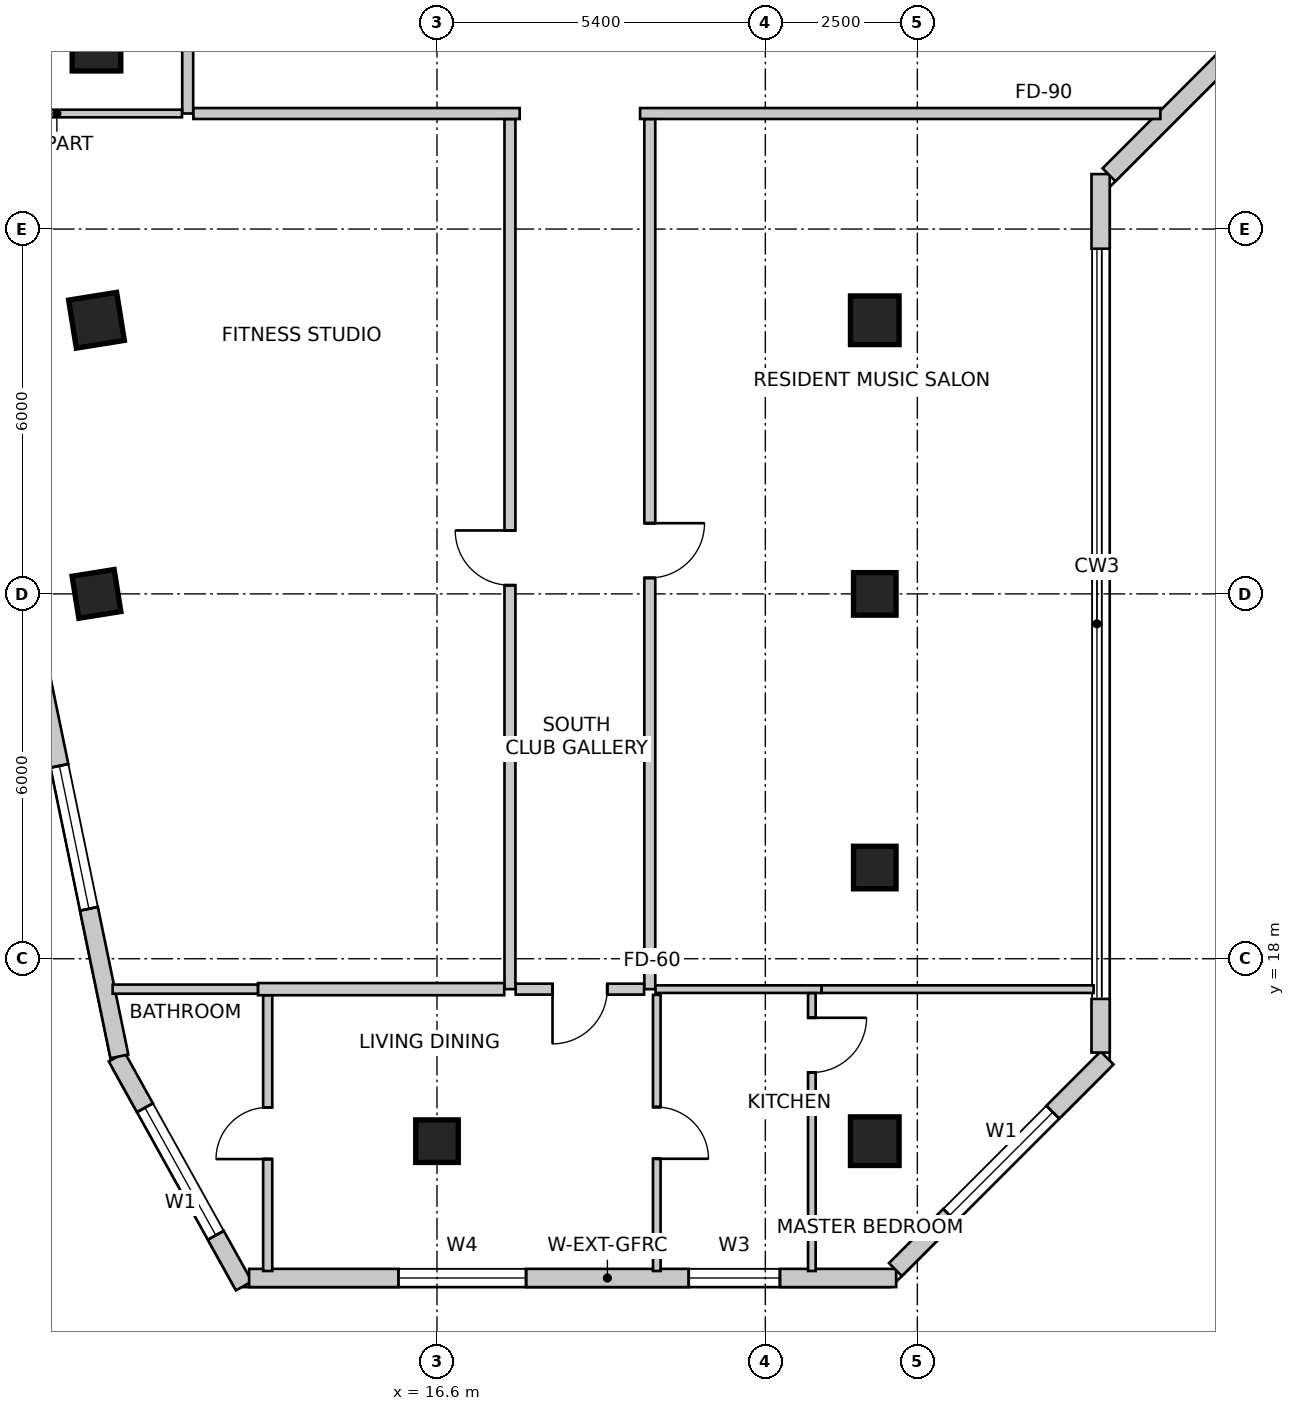
"""IFC4 building model, lengths in metres.
Left out: names, types, materials, properties, quantities, classifications, styles, units other than length and angle.
Written with IfcOpenShell. Run it as: python <this file> out.ifc"""

import sys

from ifc_helpers import new_model, si_unit, direction, frame, frame_2d, origin, origin_2d, place, context, subcontext, project, spatial, rectangle, extrude, source, transform, mapped, element, fill, save


model = new_model("IFC4")
c1 = context("Model", 3, precision=1e-05, world=origin(), true_north=direction((0.0, 1.0)))
c2 = subcontext(c1, "Body", "Model", "MODEL_VIEW")
j1 = project(units=[si_unit("LENGTHUNIT", "METRE"), si_unit("PLANEANGLEUNIT", "RADIAN")], contexts=[c1])
p1 = place(None, origin())
s1 = spatial("IfcSite", under=j1, at=p1, CompositionType="ELEMENT")
p2 = place(p1, origin())
s2 = spatial("IfcBuilding", under=s1, at=p2, CompositionType="ELEMENT")
p3 = place(p2, frame((0.0, 0.0, 225.4)))
s3 = spatial("IfcBuildingStorey", under=s2, at=p3, CompositionType="ELEMENT", Elevation=225.4)
m1 = source(origin(), c2, "Body", "SweptSolid", [
    extrude(rectangle(XDim=0.8, YDim=0.8, at=origin_2d()), origin(), (0.0, 0.0, 1.0), 3.5),
])
for number, where, z_axis, x_axis in (
    (1, (11.0, 33.0, 0.0), (0.0, 0.0, 1.0), (1.0, 0.0, 0.0)),
    (2, (11.0, 28.5, 0.0), (0.0, 0.0, 1.0), (0.158, -0.987, 0.0)),
):
    element("IfcColumn", number, at=place(p3, frame(where, z_axis=z_axis, x_axis=x_axis)), inside=s3, PredefinedType="COLUMN", context=c2, shape_type="MappedRepresentation", body=[
        mapped(m1, transform((0.0, 0.0, 0.0), scale=1.0)),
    ])
m2 = source(origin(), c2, "Body", "SweptSolid", [
    extrude(rectangle(XDim=0.7, YDim=0.7, at=origin_2d()), origin(), (0.0, 0.0, 1.0), 3.5),
])
p4 = place(p3, frame((11.0, 24.0, 0.0), z_axis=(0.0, 0.0, 1.0), x_axis=(0.158158067254, -0.987413806751, 0.0)))
e3 = element("IfcColumn", 3, at=p4, inside=s3, PredefinedType="COLUMN", context=c2, shape_type="MappedRepresentation", body=[
    mapped(m2, transform((0.0, 0.0, 0.0), scale=1.0)),
])
p5 = place(p3, frame((23.8, 28.5, 0.0), z_axis=(0.0, 0.0, 1.0), x_axis=(1.0, 0.0, 0.0)))
e4 = element("IfcColumn", 4, at=p5, inside=s3, PredefinedType="COLUMN", context=c2, shape_type="MappedRepresentation", body=[
    mapped(m1, transform((0.0, 0.0, 0.0), scale=1.0)),
])
for number, where, z_axis, x_axis in (
    (5, (23.8, 24.0, 0.0), (0.0, 0.0, 1.0), (1.0, 0.0, 0.0)),
    (6, (23.8, 19.5, 0.0), (0.0, 0.0, 1.0), (1.0, 0.0, 0.0)),
):
    element("IfcColumn", number, at=place(p3, frame(where, z_axis=z_axis, x_axis=x_axis)), inside=s3, PredefinedType="COLUMN", context=c2, shape_type="MappedRepresentation", body=[
        mapped(m2, transform((0.0, 0.0, 0.0), scale=1.0)),
    ])
p6 = place(p3, frame((23.8, 15.0, 0.0), z_axis=(0.0, 0.0, 1.0), x_axis=(1.0, 0.0, 0.0)))
e7 = element("IfcColumn", 7, at=p6, inside=s3, PredefinedType="COLUMN", context=c2, shape_type="MappedRepresentation", body=[
    mapped(m1, transform((0.0, 0.0, 0.0), scale=1.0)),
])
p7 = place(p3, frame((16.6, 15.0, 0.0), z_axis=(0.0, 0.0, 1.0), x_axis=(1.0, 0.0, 0.0)))
e8 = element("IfcColumn", 8, at=p7, inside=s3, PredefinedType="COLUMN", context=c2, shape_type="MappedRepresentation", body=[
    mapped(m2, transform((0.0, 0.0, 0.0), scale=1.0)),
])
p8 = place(p3, frame((11.333, 16.384, 0.0), z_axis=(0.0, 0.0, 1.0), x_axis=(0.485633305139, -0.874162623852, 0.0)))
e9 = element("IfcWall", 9, at=p8, inside=s3, PredefinedType="SOLIDWALL", context=c2, shape_type="SweptSolid", body=[
    extrude(rectangle(XDim=4.307, YDim=0.3, at=frame_2d((2.153, 0.0))), origin(), (0.0, 0.0, 1.0), 3.25),
])
m3 = source(origin(), c2, "Body", "SweptSolid", [
    extrude(rectangle(XDim=2.4, YDim=2.2, at=frame_2d((1.2, 1.1))), frame((0.0, 0.16, 0.0), z_axis=(0.0, -1.0, 0.0), x_axis=(1.0, 0.0, 0.0)), (0.0, 0.0, 1.0), 0.32),
])
p9 = place(p8, frame((0.954, 0.0, 0.85)))
e10 = element("IfcOpeningElement", 10, at=p9, cuts=e9, PredefinedType="OPENING", context=c2, shape_type="MappedRepresentation", body=[
    mapped(m3, transform((0.0, 0.0, 0.0), scale=1.0)),
])
p10 = place(p3, frame((13.51, 12.75, 0.0), z_axis=(0.0, 0.0, 1.0), x_axis=(1.0, 0.0, 0.0)))
e11 = element("IfcWall", 11, at=p10, inside=s3, PredefinedType="SOLIDWALL", context=c2, shape_type="SweptSolid", body=[
    extrude(rectangle(XDim=10.642, YDim=0.3, at=frame_2d((5.321, 0.0))), origin(), (0.0, 0.0, 1.0), 3.25),
])
m4 = source(origin(), c2, "Body", "SweptSolid", [
    extrude(rectangle(XDim=2.1, YDim=2.0, at=frame_2d((1.05, 1.0))), frame((0.0, 0.16, 0.0), z_axis=(0.0, -1.0, 0.0), x_axis=(1.0, 0.0, 0.0)), (0.0, 0.0, 1.0), 0.32),
])
p11 = place(p10, frame((2.455, 0.0, 0.85)))
e12 = element("IfcOpeningElement", 12, at=p11, cuts=e11, PredefinedType="OPENING", context=c2, shape_type="MappedRepresentation", body=[
    mapped(m4, transform((0.0, 0.0, 0.0), scale=1.0)),
])
m5 = source(origin(), c2, "Body", "SweptSolid", [
    extrude(rectangle(XDim=1.5, YDim=1.8, at=frame_2d((0.75, 0.9))), frame((0.0, 0.16, 0.0), z_axis=(0.0, -1.0, 0.0), x_axis=(1.0, 0.0, 0.0)), (0.0, 0.0, 1.0), 0.32),
])
p12 = place(p10, frame((7.23, 0.0, 0.85)))
e13 = element("IfcOpeningElement", 13, at=p12, cuts=e11, PredefinedType="OPENING", context=c2, shape_type="MappedRepresentation", body=[
    mapped(m5, transform((0.0, 0.0, 0.0), scale=1.0)),
])
p13 = place(p3, frame((24.14, 12.888, 0.0), z_axis=(0.0, 0.0, 1.0), x_axis=(0.707106781187, 0.707106781187, 0.0)))
e14 = element("IfcWall", 14, at=p13, inside=s3, PredefinedType="SOLIDWALL", context=c2, shape_type="SweptSolid", body=[
    extrude(rectangle(XDim=4.922, YDim=0.3, at=frame_2d((2.461, 0.0))), origin(), (0.0, 0.0, 1.0), 3.25),
])
p14 = place(p13, frame((1.261, 0.0, 0.85)))
e15 = element("IfcOpeningElement", 15, at=p14, cuts=e14, PredefinedType="OPENING", context=c2, shape_type="MappedRepresentation", body=[
    mapped(m3, transform((0.0, 0.0, 0.0), scale=1.0)),
])
p15 = place(p3, frame((27.514, 16.457, 0.0), z_axis=(0.0, 0.0, 1.0), x_axis=(0.0, 1.0, 0.0)))
e16 = element("IfcWall", 16, at=p15, inside=s3, PredefinedType="SOLIDWALL", context=c2, shape_type="SweptSolid", body=[
    extrude(rectangle(XDim=0.882, YDim=0.3, at=frame_2d((0.441, 0.0))), origin(), (0.0, 0.0, 1.0), 3.25),
])
p16 = place(p3, frame((27.514, 29.677, 0.0), z_axis=(0.0, 0.0, 1.0), x_axis=(0.0, 1.0, 0.0)))
e17 = element("IfcWall", 17, at=p16, inside=s3, PredefinedType="SOLIDWALL", context=c2, shape_type="SweptSolid", body=[
    extrude(rectangle(XDim=1.228, YDim=0.3, at=frame_2d((0.614, 0.0))), origin(), (0.0, 0.0, 1.0), 3.25),
])
p17 = place(p3, frame((27.652, 30.892, 0.0), z_axis=(0.0, 0.0, 1.0), x_axis=(0.707106781187, 0.707106781187, 0.0)))
e18 = element("IfcWall", 18, at=p17, inside=s3, PredefinedType="SOLIDWALL", context=c2, shape_type="SweptSolid", body=[
    extrude(rectangle(XDim=2.907, YDim=0.3, at=frame_2d((1.454, 0.0))), origin(), (0.0, 0.0, 1.0), 3.25),
])
p18 = place(p3, frame((13.269, 47.134, 0.0), z_axis=(0.0, 0.0, 1.0), x_axis=(-0.319920776449, -0.947444297464, 0.0)))
e19 = element("IfcWall", 19, at=p18, inside=s3, PredefinedType="SOLIDWALL", context=c2, shape_type="SweptSolid", body=[
    extrude(rectangle(XDim=16.133, YDim=0.3, at=frame_2d((8.067, 0.0))), origin(), (0.0, 0.0, 1.0), 3.25),
])
p19 = place(p18, frame((2.513, 0.0, 0.85)))
e20 = element("IfcOpeningElement", 20, at=p19, cuts=e19, PredefinedType="OPENING", context=c2, shape_type="MappedRepresentation", body=[
    mapped(m4, transform((0.0, 0.0, 0.0), scale=1.0)),
])
p20 = place(p18, frame((7.26, 0.0, 0.85)))
e21 = element("IfcOpeningElement", 21, at=p20, cuts=e19, PredefinedType="OPENING", context=c2, shape_type="MappedRepresentation", body=[
    mapped(m3, transform((0.0, 0.0, 0.0), scale=1.0)),
])
p21 = place(p18, frame((12.307, 0.0, 0.85)))
e22 = element("IfcOpeningElement", 22, at=p21, cuts=e19, PredefinedType="OPENING", context=c2, shape_type="MappedRepresentation", body=[
    mapped(m4, transform((0.0, 0.0, 0.0), scale=1.0)),
])
p22 = place(p3, frame((8.188, 31.834, 0.0), z_axis=(0.0, 0.0, 1.0), x_axis=(0.202303475707, -0.979322880217, 0.0)))
e23 = element("IfcWall", 23, at=p22, inside=s3, PredefinedType="SOLIDWALL", context=c2, shape_type="SweptSolid", body=[
    extrude(rectangle(XDim=15.766, YDim=0.3, at=frame_2d((7.883, 0.0))), origin(), (0.0, 0.0, 1.0), 3.25),
])
p23 = place(p22, frame((1.473, 0.0, 0.85)))
e24 = element("IfcOpeningElement", 24, at=p23, cuts=e23, PredefinedType="OPENING", context=c2, shape_type="MappedRepresentation", body=[
    mapped(m3, transform((0.0, 0.0, 0.0), scale=1.0)),
])
p24 = place(p22, frame((6.33, 0.0, 0.85)))
e25 = element("IfcOpeningElement", 25, at=p24, cuts=e23, PredefinedType="OPENING", context=c2, shape_type="MappedRepresentation", body=[
    mapped(m4, transform((0.0, 0.0, 0.0), scale=1.0)),
])
p25 = place(p22, frame((10.887, 0.0, 0.85)))
e26 = element("IfcOpeningElement", 26, at=p25, cuts=e23, PredefinedType="OPENING", context=c2, shape_type="MappedRepresentation", body=[
    mapped(m3, transform((0.0, 0.0, 0.0), scale=1.0)),
])
p26 = place(p3, frame((12.5, 31.9, 0.0), z_axis=(0.0, 0.0, 1.0), x_axis=(0.0, 1.0, 0.0)))
e27 = element("IfcWall", 27, at=p26, inside=s3, PredefinedType="PARTITIONING", context=c2, shape_type="SweptSolid", body=[
    extrude(rectangle(XDim=1.556, YDim=0.18, at=frame_2d((0.778, 0.0))), origin(), (0.0, 0.0, 1.0), 2.835),
])
p27 = place(p3, frame((17.96, 31.9, 0.0), z_axis=(0.0, 0.0, 1.0), x_axis=(-1.0, 0.0, 0.0)))
e28 = element("IfcWall", 28, at=p27, inside=s3, PredefinedType="PARTITIONING", context=c2, shape_type="SweptSolid", body=[
    extrude(rectangle(XDim=5.366, YDim=0.18, at=frame_2d((2.683, 0.0))), origin(), (0.0, 0.0, 1.0), 2.835),
])
p28 = place(p3, frame((28.497, 31.9, 0.0), z_axis=(0.0, 0.0, 1.0), x_axis=(-1.0, 0.0, 0.0)))
e29 = element("IfcWall", 29, at=p28, inside=s3, PredefinedType="PARTITIONING", context=c2, shape_type="SweptSolid", body=[
    extrude(rectangle(XDim=8.557, YDim=0.18, at=frame_2d((4.279, 0.0))), origin(), (0.0, 0.0, 1.0), 2.835),
])
p29 = place(p3, frame((12.406, 31.9, 0.0), z_axis=(0.0, 0.0, 1.0), x_axis=(-1.0, 0.0, 0.0)))
e30 = element("IfcWall", 30, at=p29, inside=s3, PredefinedType="PARTITIONING", context=c2, shape_type="SweptSolid", body=[
    extrude(rectangle(XDim=4.115, YDim=0.125, at=frame_2d((2.057, 0.0))), origin(), (0.0, 0.0, 1.0), 2.542),
])
p30 = place(p3, frame((17.8, 17.5, 0.0), z_axis=(0.0, 0.0, 1.0), x_axis=(0.0, 1.0, 0.0)))
e31 = element("IfcWall", 31, at=p30, inside=s3, PredefinedType="PARTITIONING", context=c2, shape_type="SweptSolid", body=[
    extrude(rectangle(XDim=14.306, YDim=0.18, at=frame_2d((7.153, 0.0))), origin(), (0.0, 0.0, 1.0), 2.688),
])
m6 = source(origin(), c2, "Body", "SweptSolid", [
    extrude(rectangle(XDim=0.9, YDim=2.15, at=frame_2d((0.45, 1.075))), frame((0.0, 0.1, 0.0), z_axis=(0.0, -1.0, 0.0), x_axis=(1.0, 0.0, 0.0)), (0.0, 0.0, 1.0), 0.2),
])
p31 = place(p30, frame((6.643, 0.0, 0.0)))
e32 = element("IfcOpeningElement", 32, at=p31, cuts=e31, PredefinedType="OPENING", context=c2, shape_type="MappedRepresentation", body=[
    mapped(m6, transform((0.0, 0.0, 0.0), scale=1.0)),
])
p32 = place(p3, frame((20.1, 31.806, 0.0), z_axis=(0.0, 0.0, 1.0), x_axis=(0.0, -1.0, 0.0)))
e33 = element("IfcWall", 33, at=p32, inside=s3, PredefinedType="PARTITIONING", context=c2, shape_type="SweptSolid", body=[
    extrude(rectangle(XDim=14.306, YDim=0.18, at=frame_2d((7.153, 0.0))), origin(), (0.0, 0.0, 1.0), 2.688),
])
p33 = place(p32, frame((6.643, 0.0, 0.0)))
e34 = element("IfcOpeningElement", 34, at=p33, cuts=e33, PredefinedType="OPENING", context=c2, shape_type="MappedRepresentation", body=[
    mapped(m6, transform((0.0, 0.0, 0.0), scale=1.0)),
])
p34 = place(p3, frame((20.006, 17.5, 0.0), z_axis=(0.0, 0.0, 1.0), x_axis=(-1.0, 0.0, 0.0)))
e35 = element("IfcWall", 35, at=p34, inside=s3, PredefinedType="PARTITIONING", context=c2, shape_type="SweptSolid", body=[
    extrude(rectangle(XDim=2.112, YDim=0.18, at=frame_2d((1.056, 0.0))), origin(), (0.0, 0.0, 1.0), 3.25),
])
p35 = place(p34, frame((0.606, 0.0, 0.0)))
e36 = element("IfcOpeningElement", 36, at=p35, cuts=e35, PredefinedType="OPENING", context=c2, shape_type="MappedRepresentation", body=[
    mapped(m6, transform((0.0, 0.0, 0.0), scale=1.0)),
])
p36 = place(p3, frame((17.706, 17.5, 0.0), z_axis=(0.0, 0.0, 1.0), x_axis=(-1.0, 0.0, 0.0)))
e37 = element("IfcWall", 37, at=p36, inside=s3, PredefinedType="PARTITIONING", context=c2, shape_type="SweptSolid", body=[
    extrude(rectangle(XDim=4.05, YDim=0.2, at=frame_2d((2.025, 0.0))), origin(), (0.0, 0.0, 1.0), 3.25),
])
p37 = place(p3, frame((13.654, 17.5, 0.0), z_axis=(0.0, 0.0, 1.0), x_axis=(-1.0, 0.0, 0.0)))
e38 = element("IfcWall", 38, at=p37, inside=s3, PredefinedType="PARTITIONING", context=c2, shape_type="SweptSolid", body=[
    extrude(rectangle(XDim=2.388, YDim=0.15, at=frame_2d((1.194, 0.0))), origin(), (0.0, 0.0, 1.0), 3.25),
])
p38 = place(p3, frame((22.925, 17.5, 0.0), z_axis=(0.0, 0.0, 1.0), x_axis=(-1.0, 0.0, 0.0)))
e39 = element("IfcWall", 39, at=p38, inside=s3, PredefinedType="PARTITIONING", context=c2, shape_type="SweptSolid", body=[
    extrude(rectangle(XDim=2.731, YDim=0.125, at=frame_2d((1.365, 0.0))), origin(), (0.0, 0.0, 1.0), 2.688),
])
p39 = place(p3, frame((27.399, 17.5, 0.0), z_axis=(0.0, 0.0, 1.0), x_axis=(-1.0, 0.0, 0.0)))
e40 = element("IfcWall", 40, at=p39, inside=s3, PredefinedType="PARTITIONING", context=c2, shape_type="SweptSolid", body=[
    extrude(rectangle(XDim=4.472, YDim=0.125, at=frame_2d((2.236, 0.0))), origin(), (0.0, 0.0, 1.0), 2.542),
])
p40 = place(p3, frame((13.816, 12.865, 0.0), z_axis=(0.0, 0.0, 1.0), x_axis=(0.0, 1.0, 0.0)))
e41 = element("IfcWall", 41, at=p40, inside=s3, PredefinedType="PARTITIONING", context=c2, shape_type="SweptSolid", body=[
    extrude(rectangle(XDim=4.531, YDim=0.15, at=frame_2d((2.266, 0.0))), origin(), (0.0, 0.0, 1.0), 3.25),
])
m7 = source(origin(), c2, "Body", "SweptSolid", [
    extrude(rectangle(XDim=0.85, YDim=2.15, at=frame_2d((0.425, 1.075))), frame((0.0, 0.085, 0.0), z_axis=(0.0, -1.0, 0.0), x_axis=(1.0, 0.0, 0.0)), (0.0, 0.0, 1.0), 0.17),
])
p41 = place(p40, frame((1.841, 0.0, 0.0)))
e42 = element("IfcOpeningElement", 42, at=p41, cuts=e41, PredefinedType="OPENING", context=c2, shape_type="MappedRepresentation", body=[
    mapped(m7, transform((0.0, 0.0, 0.0), scale=1.0)),
])
p42 = place(p3, frame((20.215, 17.406, 0.0), z_axis=(0.0, 0.0, 1.0), x_axis=(0.0, -1.0, 0.0)))
e43 = element("IfcWall", 43, at=p42, inside=s3, PredefinedType="PARTITIONING", context=c2, shape_type="SweptSolid", body=[
    extrude(rectangle(XDim=4.541, YDim=0.125, at=frame_2d((2.271, 0.0))), origin(), (0.0, 0.0, 1.0), 2.542),
])
m8 = source(origin(), c2, "Body", "SweptSolid", [
    extrude(rectangle(XDim=0.85, YDim=2.15, at=frame_2d((0.425, 1.075))), frame((0.0, 0.073, 0.0), z_axis=(0.0, -1.0, 0.0), x_axis=(1.0, 0.0, 0.0)), (0.0, 0.0, 1.0), 0.145),
])
p43 = place(p42, frame((1.845, 0.0, 0.0)))
e44 = element("IfcOpeningElement", 44, at=p43, cuts=e43, PredefinedType="OPENING", context=c2, shape_type="MappedRepresentation", body=[
    mapped(m8, transform((0.0, 0.0, 0.0), scale=1.0)),
])
p44 = place(p3, frame((22.765, 17.434, 0.0), z_axis=(0.0, 0.0, 1.0), x_axis=(0.0, -1.0, 0.0)))
e45 = element("IfcWall", 45, at=p44, inside=s3, PredefinedType="PARTITIONING", context=c2, shape_type="SweptSolid", body=[
    extrude(rectangle(XDim=4.569, YDim=0.125, at=frame_2d((2.284, 0.0))), origin(), (0.0, 0.0, 1.0), 2.542),
])
m9 = source(origin(), c2, "Body", "SweptSolid", [
    extrude(rectangle(XDim=0.9, YDim=2.15, at=frame_2d((0.45, 1.075))), frame((0.0, 0.073, 0.0), z_axis=(0.0, -1.0, 0.0), x_axis=(1.0, 0.0, 0.0)), (0.0, 0.0, 1.0), 0.145),
])
p45 = place(p44, frame((0.404, 0.0, 0.0)))
e46 = element("IfcOpeningElement", 46, at=p45, cuts=e45, PredefinedType="OPENING", context=c2, shape_type="MappedRepresentation", body=[
    mapped(m9, transform((0.0, 0.0, 0.0), scale=1.0)),
])
m10 = source(origin(), c2, "Body", "SweptSolid", [
    extrude(rectangle(XDim=2.4, YDim=2.2, at=frame_2d((1.2, 1.1))), frame((0.0, -0.015, 0.0), z_axis=(0.0, -1.0, 0.0), x_axis=(1.0, 0.0, 0.0)), (0.0, 0.0, 1.0), 0.06),
])
p46 = place(p9, origin())
e47 = element("IfcWindow", 47, at=p46, inside=s3, PartitioningType="SINGLE_PANEL", PredefinedType="WINDOW", context=c2, shape_type="MappedRepresentation", body=[
    mapped(m10, transform((0.0, 0.0, 0.0), scale=1.0)),
])
fill(e10, e47)
m11 = source(origin(), c2, "Body", "SweptSolid", [
    extrude(rectangle(XDim=2.1, YDim=2.0, at=frame_2d((1.05, 1.0))), frame((0.0, -0.015, 0.0), z_axis=(0.0, -1.0, 0.0), x_axis=(1.0, 0.0, 0.0)), (0.0, 0.0, 1.0), 0.06),
])
p47 = place(p11, origin())
e48 = element("IfcWindow", 48, at=p47, inside=s3, PartitioningType="SINGLE_PANEL", PredefinedType="WINDOW", context=c2, shape_type="MappedRepresentation", body=[
    mapped(m11, transform((0.0, 0.0, 0.0), scale=1.0)),
])
fill(e12, e48)
m12 = source(origin(), c2, "Body", "SweptSolid", [
    extrude(rectangle(XDim=1.5, YDim=1.8, at=frame_2d((0.75, 0.9))), frame((0.0, -0.015, 0.0), z_axis=(0.0, -1.0, 0.0), x_axis=(1.0, 0.0, 0.0)), (0.0, 0.0, 1.0), 0.06),
])
p48 = place(p12, origin())
e49 = element("IfcWindow", 49, at=p48, inside=s3, PartitioningType="SINGLE_PANEL", PredefinedType="WINDOW", context=c2, shape_type="MappedRepresentation", body=[
    mapped(m12, transform((0.0, 0.0, 0.0), scale=1.0)),
])
fill(e13, e49)
p49 = place(p14, origin())
e50 = element("IfcWindow", 50, at=p49, inside=s3, PartitioningType="SINGLE_PANEL", PredefinedType="WINDOW", context=c2, shape_type="MappedRepresentation", body=[
    mapped(m10, transform((0.0, 0.0, 0.0), scale=1.0)),
])
fill(e15, e50)
p50 = place(p25, origin())
e51 = element("IfcWindow", 51, at=p50, inside=s3, PartitioningType="SINGLE_PANEL", PredefinedType="WINDOW", context=c2, shape_type="MappedRepresentation", body=[
    mapped(m10, transform((0.0, 0.0, 0.0), scale=1.0)),
])
fill(e26, e51)
m13 = source(origin(), c2, "Body", "SweptSolid", [
    extrude(rectangle(XDim=0.9, YDim=2.15, at=frame_2d((0.45, 1.075))), frame((0.0, 0.025, 0.0), z_axis=(0.0, -1.0, 0.0), x_axis=(1.0, 0.0, 0.0)), (0.0, 0.0, 1.0), 0.05),
])
p51 = place(p31, origin())
e52 = element("IfcDoor", 52, at=p51, inside=s3, OperationType="SINGLE_SWING_RIGHT", PredefinedType="DOOR", context=c2, shape_type="MappedRepresentation", body=[
    mapped(m13, transform((0.0, 0.0, 0.0), scale=1.0)),
])
fill(e32, e52)
p52 = place(p33, origin())
e53 = element("IfcDoor", 53, at=p52, inside=s3, OperationType="SINGLE_SWING_LEFT", PredefinedType="DOOR", context=c2, shape_type="MappedRepresentation", body=[
    mapped(m13, transform((0.0, 0.0, 0.0), scale=1.0)),
])
fill(e34, e53)
m14 = source(origin(), c2, "Body", "SweptSolid", [
    extrude(rectangle(XDim=0.9, YDim=2.15, at=frame_2d((0.45, 1.075))), frame((0.0, 0.025, 0.0), z_axis=(0.0, -1.0, 0.0), x_axis=(1.0, 0.0, 0.0)), (0.0, 0.0, 1.0), 0.05),
])
p53 = place(p35, origin())
e54 = element("IfcDoor", 54, at=p53, inside=s3, OperationType="SINGLE_SWING_RIGHT", PredefinedType="DOOR", context=c2, shape_type="MappedRepresentation", body=[
    mapped(m14, transform((0.0, 0.0, 0.0), scale=1.0)),
])
fill(e36, e54)
m15 = source(origin(), c2, "Body", "SweptSolid", [
    extrude(rectangle(XDim=0.85, YDim=2.15, at=frame_2d((0.425, 1.075))), frame((0.0, 0.025, 0.0), z_axis=(0.0, -1.0, 0.0), x_axis=(1.0, 0.0, 0.0)), (0.0, 0.0, 1.0), 0.05),
])
p54 = place(p41, origin())
e55 = element("IfcDoor", 55, at=p54, inside=s3, OperationType="SINGLE_SWING_LEFT", PredefinedType="DOOR", context=c2, shape_type="MappedRepresentation", body=[
    mapped(m15, transform((0.0, 0.0, 0.0), scale=1.0)),
])
fill(e42, e55)
p55 = place(p43, origin())
e56 = element("IfcDoor", 56, at=p55, inside=s3, OperationType="SINGLE_SWING_RIGHT", PredefinedType="DOOR", context=c2, shape_type="MappedRepresentation", body=[
    mapped(m15, transform((0.0, 0.0, 0.0), scale=1.0)),
])
fill(e44, e56)
p56 = place(p45, origin())
e57 = element("IfcDoor", 57, at=p56, inside=s3, OperationType="SINGLE_SWING_LEFT", PredefinedType="DOOR", context=c2, shape_type="MappedRepresentation", body=[
    mapped(m13, transform((0.0, 0.0, 0.0), scale=1.0)),
])
fill(e46, e57)
save(model, sys.argv[1])
